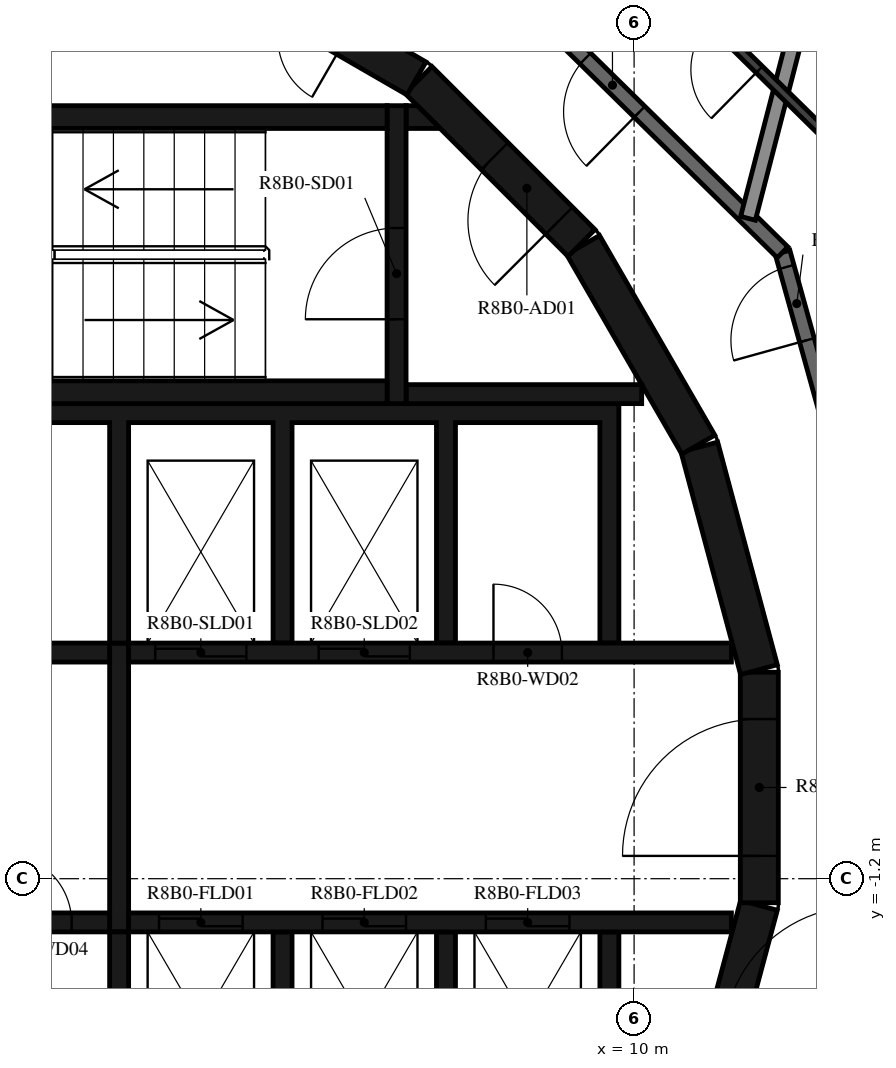
"""IFC4 building model, lengths in metres.
Left out: names, types, materials, properties, quantities, classifications, styles, units other than length and angle.
Written with IfcOpenShell. Run it as: python <this file> out.ifc"""

import sys

from ifc_helpers import new_model, si_unit, direction, frame, frame_2d, origin, place, context, subcontext, project, spatial, polyline, rectangle, outline, extrude, element, fill, save


model = new_model("IFC4")
c1 = context("Model", 3, precision=1e-05, world=origin(), true_north=direction((0.0, 1.0)))
c2 = subcontext(c1, "Body", "Model", "MODEL_VIEW")
j1 = project(units=[si_unit("LENGTHUNIT", "METRE"), si_unit("PLANEANGLEUNIT", "RADIAN")], contexts=[c1])
p1 = place(None, origin())
s1 = spatial("IfcSite", under=j1, at=p1, CompositionType="ELEMENT")
p2 = place(p1, origin())
s2 = spatial("IfcBuilding", under=s1, at=p2, CompositionType="ELEMENT")
p3 = place(p2, frame((0.0, 0.0, 312.2)))
s3 = spatial("IfcBuildingStorey", under=s2, at=p3, CompositionType="ELEMENT", Elevation=312.2)
p4 = place(p3, frame((10.858, -4.479, 0.0), z_axis=(0.0, 0.0, 1.0), x_axis=(0.258734743916, 0.965948410781, 0.0)))
e1 = element("IfcWall", 1, at=p4, inside=s3, PredefinedType="SHEAR", context=c2, shape_type="SweptSolid", body=[
    extrude(rectangle(XDim=3.033, YDim=0.5, at=frame_2d((1.516, 0.0))), origin(), (0.0, 0.0, 1.0), 3.12),
])
p5 = place(p3, frame((11.647, -1.516, 0.0), z_axis=(0.0, 0.0, 1.0), x_axis=(0.0, 1.0, 0.0)))
e2 = element("IfcWall", 2, at=p5, inside=s3, PredefinedType="SHEAR", context=c2, shape_type="SweptSolid", body=[
    extrude(rectangle(XDim=3.033, YDim=0.5, at=frame_2d((1.516, 0.0))), origin(), (0.0, 0.0, 1.0), 3.12),
])
p6 = place(p5, frame((0.616, 0.0, 0.0)))
e3 = element("IfcOpeningElement", 3, at=p6, cuts=e2, PredefinedType="OPENING", context=c2, shape_type="SweptSolid", body=[
    extrude(rectangle(XDim=1.8, YDim=2.1, at=frame_2d((0.9, 1.05))), frame((0.0, 0.26, 0.0), z_axis=(0.0, -1.0, 0.0), x_axis=(1.0, 0.0, 0.0)), (0.0, 0.0, 1.0), 0.52),
])
for number, where, z_axis, x_axis in (
    (4, (11.643, 1.55, 0.0), (0.0, 0.0, 1.0), (-0.259, 0.966, 0.0)),
    (5, (10.845, 4.51, 0.0), (0.0, 0.0, 1.0), (-0.5, 0.866, 0.0)),
):
    element("IfcWall", number, at=place(p3, frame(where, z_axis=z_axis, x_axis=x_axis)), inside=s3, PredefinedType="SHEAR", context=c2, shape_type="SweptSolid", body=[
        extrude(rectangle(XDim=3.033, YDim=0.5, at=frame_2d((1.516, 0.0))), origin(), (0.0, 0.0, 1.0), 3.12),
    ])
p7 = place(p3, frame((9.308, 7.164, 0.0), z_axis=(0.0, 0.0, 1.0), x_axis=(-0.707106781187, 0.707106781187, 0.0)))
e6 = element("IfcWall", 6, at=p7, inside=s3, PredefinedType="SHEAR", context=c2, shape_type="SweptSolid", body=[
    extrude(rectangle(XDim=3.032, YDim=0.5, at=frame_2d((1.516, 0.0))), origin(), (0.0, 0.0, 1.0), 3.12),
])
p8 = place(p7, frame((0.416, 0.0, 0.0)))
e7 = element("IfcOpeningElement", 7, at=p8, cuts=e6, PredefinedType="OPENING", context=c2, shape_type="SweptSolid", body=[
    extrude(rectangle(XDim=1.2, YDim=2.1, at=frame_2d((0.6, 1.05))), frame((0.0, 0.26, 0.0), z_axis=(0.0, -1.0, 0.0), x_axis=(1.0, 0.0, 0.0)), (0.0, 0.0, 1.0), 0.52),
])
p9 = place(p3, frame((7.137, 9.329, 0.0), z_axis=(0.0, 0.0, 1.0), x_axis=(-0.865975092491, 0.500087131594, 0.0)))
e8 = element("IfcWall", 8, at=p9, inside=s3, PredefinedType="SHEAR", context=c2, shape_type="SweptSolid", body=[
    extrude(rectangle(XDim=3.033, YDim=0.5, at=frame_2d((1.516, 0.0))), origin(), (0.0, 0.0, 1.0), 3.12),
])
p10 = place(p9, frame((1.066, 0.0, 0.0)))
e9 = element("IfcOpeningElement", 9, at=p10, cuts=e8, PredefinedType="OPENING", context=c2, shape_type="SweptSolid", body=[
    extrude(rectangle(XDim=0.9, YDim=2.1, at=frame_2d((0.45, 1.05))), frame((0.0, 0.26, 0.0), z_axis=(0.0, -1.0, 0.0), x_axis=(1.0, 0.0, 0.0)), (0.0, 0.0, 1.0), 0.52),
])
for number, where, z_axis, x_axis in (
    (10, (0.0, 5.2, 0.0), (0.0, 0.0, 1.0), (1.0, 0.0, 0.0)),
    (11, (0.0, 8.82, 0.0), (0.0, 0.0, 1.0), (1.0, 0.0, 0.0)),
):
    element("IfcWall", number, at=place(p3, frame(where, z_axis=z_axis, x_axis=x_axis)), inside=s3, PredefinedType="SHEAR", context=c2, shape_type="SweptSolid", body=[
        extrude(rectangle(XDim=6.75, YDim=0.3, at=frame_2d((3.375, 0.0))), origin(), (0.0, 0.0, 1.0), 3.12),
    ])
p11 = place(p3, frame((6.875, 5.05, 0.0), z_axis=(0.0, 0.0, 1.0), x_axis=(0.0, 1.0, 0.0)))
e12 = element("IfcWall", 12, at=p11, inside=s3, PredefinedType="SHEAR", context=c2, shape_type="SweptSolid", body=[
    extrude(rectangle(XDim=3.92, YDim=0.25, at=frame_2d((1.96, 0.0))), origin(), (0.0, 0.0, 1.0), 3.12),
])
p12 = place(p11, frame((1.11, 0.0, 0.0)))
e13 = element("IfcOpeningElement", 13, at=p12, cuts=e12, PredefinedType="OPENING", context=c2, shape_type="SweptSolid", body=[
    extrude(rectangle(XDim=1.2, YDim=2.1, at=frame_2d((0.6, 1.05))), frame((0.0, 0.135, 0.0), z_axis=(0.0, -1.0, 0.0), x_axis=(1.0, 0.0, 0.0)), (0.0, 0.0, 1.0), 0.27),
])
p13 = place(p3, frame((7.0, 5.175, 0.0), z_axis=(0.0, 0.0, 1.0), x_axis=(1.0, 0.0, 0.0)))
e14 = element("IfcWall", 14, at=p13, inside=s3, PredefinedType="SHEAR", context=c2, shape_type="SweptSolid", body=[
    extrude(rectangle(XDim=3.1, YDim=0.25, at=frame_2d((1.55, 0.0))), origin(), (0.0, 0.0, 1.0), 3.12),
])
p14 = place(p3, origin())
e15 = element("IfcWall", 15, at=p14, inside=s3, PredefinedType="SHEAR", context=c2, shape_type="SweptSolid", body=[
    extrude(outline(polyline([(7.448, 8.67), (7.0, 8.67), (7.0, 8.97), (7.148, 8.97), (7.448, 8.67)])), origin(), (0.0, 0.0, 1.0), 3.12),
])
p15 = place(p3, origin())
e16 = element("IfcWall", 16, at=p15, inside=s3, PredefinedType="SHEAR", context=c2, shape_type="SweptSolid", body=[
    extrude(outline(polyline([(-9.8, 1.9), (-9.55, 1.9), (-9.55, 4.8), (3.1, 4.8), (3.1, 1.9), (3.35, 1.9), (3.35, 4.8), (5.25, 4.8), (5.25, 1.9), (5.5, 1.9), (5.5, 4.8), (7.4, 4.8), (7.4, 1.9), (7.65, 1.9), (7.65, 4.8), (9.55, 4.8), (9.55, 1.9), (9.8, 1.9), (9.8, 4.8), (9.8, 5.05), (-9.8, 5.05), (-9.8, 4.8), (-9.8, 1.9)])), origin(), (0.0, 0.0, 1.0), 3.12),
])
p16 = place(p3, origin())
e17 = element("IfcWall", 17, at=p16, inside=s3, PredefinedType="SHEAR", context=c2, shape_type="SweptSolid", body=[
    extrude(outline(polyline([(9.8, -5.05), (9.8, -4.8), (9.8, -1.9), (9.55, -1.9), (9.55, -4.8), (7.65, -4.8), (7.65, -1.9), (7.4, -1.9), (7.4, -4.8), (5.5, -4.8), (5.5, -1.9), (5.25, -1.9), (5.25, -4.8), (3.35, -4.8), (3.35, -1.9), (3.1, -1.9), (3.1, -4.8), (1.2, -4.8), (1.2, -1.9), (0.95, -1.9), (0.95, -4.8), (-0.95, -4.8), (-0.95, -1.9), (-1.2, -1.9), (-1.2, -4.8), (-3.1, -4.8), (-3.1, -1.9), (-3.35, -1.9), (-3.35, -4.8), (-5.25, -4.8), (-5.25, -1.9), (-5.5, -1.9), (-5.5, -4.8), (-9.55, -4.8), (-9.55, -1.9), (-9.8, -1.9), (-9.8, -4.8), (-9.8, -5.05), (9.8, -5.05)])), origin(), (0.0, 0.0, 1.0), 3.12),
])
p17 = place(p3, frame((-11.28, 1.775, 0.0), z_axis=(0.0, 0.0, 1.0), x_axis=(1.0, 0.0, 0.0)))
e18 = element("IfcWall", 18, at=p17, inside=s3, PredefinedType="SHEAR", context=c2, shape_type="SweptSolid", body=[
    extrude(rectangle(XDim=14.38, YDim=0.25, at=frame_2d((7.19, 0.0))), origin(), (0.0, 0.0, 1.0), 3.12),
])
p18 = place(p17, frame((7.605, 0.0, 0.0)))
e19 = element("IfcOpeningElement", 19, at=p18, cuts=e18, PredefinedType="OPENING", context=c2, shape_type="SweptSolid", body=[
    extrude(rectangle(XDim=0.9, YDim=2.1, at=frame_2d((0.45, 1.05))), frame((0.0, 0.135, 0.0), z_axis=(0.0, -1.0, 0.0), x_axis=(1.0, 0.0, 0.0)), (0.0, 0.0, 1.0), 0.27),
])
p19 = place(p3, frame((3.35, 1.775, 0.0), z_axis=(0.0, 0.0, 1.0), x_axis=(1.0, 0.0, 0.0)))
e20 = element("IfcWall", 20, at=p19, inside=s3, PredefinedType="SHEAR", context=c2, shape_type="SweptSolid", body=[
    extrude(rectangle(XDim=7.93, YDim=0.25, at=frame_2d((3.965, 0.0))), origin(), (0.0, 0.0, 1.0), 3.12),
])
p20 = place(p19, frame((0.35, 0.0, 0.0)))
e21 = element("IfcOpeningElement", 21, at=p20, cuts=e20, PredefinedType="OPENING", context=c2, shape_type="SweptSolid", body=[
    extrude(rectangle(XDim=1.2, YDim=2.4, at=frame_2d((0.6, 1.2))), frame((0.0, 0.135, 0.0), z_axis=(0.0, -1.0, 0.0), x_axis=(1.0, 0.0, 0.0)), (0.0, 0.0, 1.0), 0.27),
])
p21 = place(p19, frame((2.5, 0.0, 0.0)))
e22 = element("IfcOpeningElement", 22, at=p21, cuts=e20, PredefinedType="OPENING", context=c2, shape_type="SweptSolid", body=[
    extrude(rectangle(XDim=1.2, YDim=2.4, at=frame_2d((0.6, 1.2))), frame((0.0, 0.135, 0.0), z_axis=(0.0, -1.0, 0.0), x_axis=(1.0, 0.0, 0.0)), (0.0, 0.0, 1.0), 0.27),
])
p22 = place(p19, frame((4.8, 0.0, 0.0)))
e23 = element("IfcOpeningElement", 23, at=p22, cuts=e20, PredefinedType="OPENING", context=c2, shape_type="SweptSolid", body=[
    extrude(rectangle(XDim=0.9, YDim=2.1, at=frame_2d((0.45, 1.05))), frame((0.0, 0.135, 0.0), z_axis=(0.0, -1.0, 0.0), x_axis=(1.0, 0.0, 0.0)), (0.0, 0.0, 1.0), 0.27),
])
p23 = place(p3, frame((-11.28, -1.775, 0.0), z_axis=(0.0, 0.0, 1.0), x_axis=(1.0, 0.0, 0.0)))
e24 = element("IfcWall", 24, at=p23, inside=s3, PredefinedType="SHEAR", context=c2, shape_type="SweptSolid", body=[
    extrude(rectangle(XDim=14.38, YDim=0.25, at=frame_2d((7.19, 0.0))), origin(), (0.0, 0.0, 1.0), 3.12),
])
p24 = place(p23, frame((6.43, 0.0, 0.0)))
e25 = element("IfcOpeningElement", 25, at=p24, cuts=e24, PredefinedType="OPENING", context=c2, shape_type="SweptSolid", body=[
    extrude(rectangle(XDim=1.1, YDim=2.1, at=frame_2d((0.55, 1.05))), frame((0.0, 0.135, 0.0), z_axis=(0.0, -1.0, 0.0), x_axis=(1.0, 0.0, 0.0)), (0.0, 0.0, 1.0), 0.27),
])
p25 = place(p23, frame((8.58, 0.0, 0.0)))
e26 = element("IfcOpeningElement", 26, at=p25, cuts=e24, PredefinedType="OPENING", context=c2, shape_type="SweptSolid", body=[
    extrude(rectangle(XDim=1.1, YDim=2.1, at=frame_2d((0.55, 1.05))), frame((0.0, 0.135, 0.0), z_axis=(0.0, -1.0, 0.0), x_axis=(1.0, 0.0, 0.0)), (0.0, 0.0, 1.0), 0.27),
])
p26 = place(p23, frame((10.73, 0.0, 0.0)))
e27 = element("IfcOpeningElement", 27, at=p26, cuts=e24, PredefinedType="OPENING", context=c2, shape_type="SweptSolid", body=[
    extrude(rectangle(XDim=1.1, YDim=2.1, at=frame_2d((0.55, 1.05))), frame((0.0, 0.135, 0.0), z_axis=(0.0, -1.0, 0.0), x_axis=(1.0, 0.0, 0.0)), (0.0, 0.0, 1.0), 0.27),
])
p27 = place(p23, frame((3.305, 0.0, 0.0)))
e28 = element("IfcOpeningElement", 28, at=p27, cuts=e24, PredefinedType="OPENING", context=c2, shape_type="SweptSolid", body=[
    extrude(rectangle(XDim=0.9, YDim=2.1, at=frame_2d((0.45, 1.05))), frame((0.0, 0.135, 0.0), z_axis=(0.0, -1.0, 0.0), x_axis=(1.0, 0.0, 0.0)), (0.0, 0.0, 1.0), 0.27),
])
p28 = place(p23, frame((12.98, 0.0, 0.0)))
e29 = element("IfcOpeningElement", 29, at=p28, cuts=e24, PredefinedType="OPENING", context=c2, shape_type="SweptSolid", body=[
    extrude(rectangle(XDim=0.9, YDim=2.1, at=frame_2d((0.45, 1.05))), frame((0.0, 0.135, 0.0), z_axis=(0.0, -1.0, 0.0), x_axis=(1.0, 0.0, 0.0)), (0.0, 0.0, 1.0), 0.27),
])
p29 = place(p3, frame((3.35, -1.775, 0.0), z_axis=(0.0, 0.0, 1.0), x_axis=(1.0, 0.0, 0.0)))
e30 = element("IfcWall", 30, at=p29, inside=s3, PredefinedType="SHEAR", context=c2, shape_type="SweptSolid", body=[
    extrude(rectangle(XDim=7.93, YDim=0.25, at=frame_2d((3.965, 0.0))), origin(), (0.0, 0.0, 1.0), 3.12),
])
p30 = place(p29, frame((0.4, 0.0, 0.0)))
e31 = element("IfcOpeningElement", 31, at=p30, cuts=e30, PredefinedType="OPENING", context=c2, shape_type="SweptSolid", body=[
    extrude(rectangle(XDim=1.1, YDim=2.4, at=frame_2d((0.55, 1.2))), frame((0.0, 0.135, 0.0), z_axis=(0.0, -1.0, 0.0), x_axis=(1.0, 0.0, 0.0)), (0.0, 0.0, 1.0), 0.27),
])
p31 = place(p29, frame((2.55, 0.0, 0.0)))
e32 = element("IfcOpeningElement", 32, at=p31, cuts=e30, PredefinedType="OPENING", context=c2, shape_type="SweptSolid", body=[
    extrude(rectangle(XDim=1.1, YDim=2.4, at=frame_2d((0.55, 1.2))), frame((0.0, 0.135, 0.0), z_axis=(0.0, -1.0, 0.0), x_axis=(1.0, 0.0, 0.0)), (0.0, 0.0, 1.0), 0.27),
])
p32 = place(p29, frame((4.7, 0.0, 0.0)))
e33 = element("IfcOpeningElement", 33, at=p32, cuts=e30, PredefinedType="OPENING", context=c2, shape_type="SweptSolid", body=[
    extrude(rectangle(XDim=1.1, YDim=2.4, at=frame_2d((0.55, 1.2))), frame((0.0, 0.135, 0.0), z_axis=(0.0, -1.0, 0.0), x_axis=(1.0, 0.0, 0.0)), (0.0, 0.0, 1.0), 0.27),
])
p33 = place(p3, frame((3.225, -1.9, 0.0), z_axis=(0.0, 0.0, 1.0), x_axis=(0.0, 1.0, 0.0)))
e34 = element("IfcWall", 34, at=p33, inside=s3, PredefinedType="SHEAR", context=c2, shape_type="SweptSolid", body=[
    extrude(rectangle(XDim=3.8, YDim=0.25, at=frame_2d((1.9, 0.0))), origin(), (0.0, 0.0, 1.0), 3.12),
])
p34 = place(p3, frame((12.074, -6.831, 0.0), z_axis=(0.0, 0.0, 1.0), x_axis=(0.250391063186, 0.968144780225, 0.0)))
e35 = element("IfcWall", 35, at=p34, inside=s3, PredefinedType="STANDARD", context=c2, shape_type="SweptSolid", body=[
    extrude(rectangle(XDim=7.181, YDim=0.2, at=frame_2d((3.591, 0.0))), origin(), (0.0, 0.0, 1.0), 3.12),
])
p35 = place(p34, frame((3.581, 0.0, 0.0)))
e36 = element("IfcOpeningElement", 36, at=p35, cuts=e35, PredefinedType="OPENING", context=c2, shape_type="SweptSolid", body=[
    extrude(rectangle(XDim=1.8, YDim=2.1, at=frame_2d((0.9, 1.05))), frame((0.0, 0.11, 0.0), z_axis=(0.0, -1.0, 0.0), x_axis=(1.0, 0.0, 0.0)), (0.0, 0.0, 1.0), 0.22),
])
p36 = place(p3, frame((12.913, 3.581, 0.0), z_axis=(0.0, 0.0, 1.0), x_axis=(-0.267223005422, 0.963634715737, 0.0)))
e37 = element("IfcWall", 37, at=p36, inside=s3, PredefinedType="STANDARD", context=c2, shape_type="SweptSolid", body=[
    extrude(rectangle(XDim=3.591, YDim=0.2, at=frame_2d((1.795, 0.0))), origin(), (0.0, 0.0, 1.0), 3.12),
])
p37 = place(p36, frame((2.39, 0.0, 0.0)))
e38 = element("IfcOpeningElement", 38, at=p37, cuts=e37, PredefinedType="OPENING", context=c2, shape_type="SweptSolid", body=[
    extrude(rectangle(XDim=1.0, YDim=2.1, at=frame_2d((0.5, 1.05))), frame((0.0, 0.11, 0.0), z_axis=(0.0, -1.0, 0.0), x_axis=(1.0, 0.0, 0.0)), (0.0, 0.0, 1.0), 0.22),
])
p38 = place(p3, frame((11.953, 7.041, 0.0), z_axis=(0.0, 0.0, 1.0), x_axis=(-0.713250549143, 0.70090916255, 0.0)))
e39 = element("IfcWall", 39, at=p38, inside=s3, PredefinedType="STANDARD", context=c2, shape_type="SweptSolid", body=[
    extrude(rectangle(XDim=7.181, YDim=0.2, at=frame_2d((3.59, 0.0))), origin(), (0.0, 0.0, 1.0), 3.12),
])
p39 = place(p38, frame((2.637, 0.0, 0.0)))
e40 = element("IfcOpeningElement", 40, at=p39, cuts=e39, PredefinedType="OPENING", context=c2, shape_type="SweptSolid", body=[
    extrude(rectangle(XDim=1.0, YDim=2.1, at=frame_2d((0.5, 1.05))), frame((0.0, 0.11, 0.0), z_axis=(0.0, -1.0, 0.0), x_axis=(1.0, 0.0, 0.0)), (0.0, 0.0, 1.0), 0.22),
])
p40 = place(p3, frame((13.26, 14.3, 0.0), z_axis=(0.0, 0.0, 1.0), x_axis=(-0.250397400042, -0.968143141303, 0.0)))
e41 = element("IfcWall", 41, at=p40, inside=s3, PredefinedType="STANDARD", context=c2, shape_type="SweptSolid", body=[
    extrude(rectangle(XDim=7.037, YDim=0.2, at=frame_2d((3.518, 0.0))), origin(), (0.0, 0.0, 1.0), 2.73),
])
p41 = place(p3, frame((12.873, 8.24, 0.0), z_axis=(0.0, 0.0, 1.0), x_axis=(-0.713251042219, 0.700908660792, 0.0)))
e42 = element("IfcWall", 42, at=p41, inside=s3, PredefinedType="PARTITIONING", context=c2, shape_type="SweptSolid", body=[
    extrude(rectangle(XDim=7.398, YDim=0.12, at=frame_2d((3.699, 0.0))), origin(), (0.0, 0.0, 1.0), 3.12),
])
p42 = place(p41, frame((1.718, 0.0, 0.0)))
e43 = element("IfcOpeningElement", 43, at=p42, cuts=e42, PredefinedType="OPENING", context=c2, shape_type="SweptSolid", body=[
    extrude(rectangle(XDim=0.9, YDim=2.1, at=frame_2d((0.45, 1.05))), frame((0.0, 0.07, 0.0), z_axis=(0.0, -1.0, 0.0), x_axis=(1.0, 0.0, 0.0)), (0.0, 0.0, 1.0), 0.14),
])
p43 = place(p12, origin())
e44 = element("IfcDoor", 44, at=p43, inside=s3, OperationType="SINGLE_SWING_LEFT", PredefinedType="DOOR", context=c2, shape_type="SweptSolid", body=[
    extrude(rectangle(XDim=1.2, YDim=2.1, at=frame_2d((0.6, 1.05))), frame((0.0, 0.025, 0.0), z_axis=(0.0, -1.0, 0.0), x_axis=(1.0, 0.0, 0.0)), (0.0, 0.0, 1.0), 0.05),
])
fill(e13, e44)
p44 = place(p8, origin())
e45 = element("IfcDoor", 45, at=p44, inside=s3, OperationType="SINGLE_SWING_RIGHT", PredefinedType="DOOR", context=c2, shape_type="SweptSolid", body=[
    extrude(rectangle(XDim=1.2, YDim=2.1, at=frame_2d((0.6, 1.05))), frame((0.0, 0.025, 0.0), z_axis=(0.0, -1.0, 0.0), x_axis=(1.0, 0.0, 0.0)), (0.0, 0.0, 1.0), 0.05),
])
fill(e7, e45)
p45 = place(p6, origin())
e46 = element("IfcDoor", 46, at=p45, inside=s3, OperationType="DOUBLE_DOOR_SINGLE_SWING", PredefinedType="DOOR", context=c2, shape_type="SweptSolid", body=[
    extrude(rectangle(XDim=1.8, YDim=2.1, at=frame_2d((0.9, 1.05))), frame((0.0, 0.025, 0.0), z_axis=(0.0, -1.0, 0.0), x_axis=(1.0, 0.0, 0.0)), (0.0, 0.0, 1.0), 0.05),
])
fill(e3, e46)
p46 = place(p20, origin())
e47 = element("IfcDoor", 47, at=p46, inside=s3, OperationType="DOUBLE_DOOR_SLIDING", PredefinedType="DOOR", context=c2, shape_type="SweptSolid", body=[
    extrude(rectangle(XDim=1.2, YDim=2.4, at=frame_2d((0.6, 1.2))), frame((0.0, 0.025, 0.0), z_axis=(0.0, -1.0, 0.0), x_axis=(1.0, 0.0, 0.0)), (0.0, 0.0, 1.0), 0.05),
])
fill(e21, e47)
p47 = place(p21, origin())
e48 = element("IfcDoor", 48, at=p47, inside=s3, OperationType="DOUBLE_DOOR_SLIDING", PredefinedType="DOOR", context=c2, shape_type="SweptSolid", body=[
    extrude(rectangle(XDim=1.2, YDim=2.4, at=frame_2d((0.6, 1.2))), frame((0.0, 0.025, 0.0), z_axis=(0.0, -1.0, 0.0), x_axis=(1.0, 0.0, 0.0)), (0.0, 0.0, 1.0), 0.05),
])
fill(e22, e48)
p48 = place(p30, origin())
e49 = element("IfcDoor", 49, at=p48, inside=s3, OperationType="DOUBLE_DOOR_SLIDING", PredefinedType="DOOR", context=c2, shape_type="SweptSolid", body=[
    extrude(rectangle(XDim=1.1, YDim=2.4, at=frame_2d((0.55, 1.2))), frame((0.0, 0.025, 0.0), z_axis=(0.0, -1.0, 0.0), x_axis=(1.0, 0.0, 0.0)), (0.0, 0.0, 1.0), 0.05),
])
fill(e31, e49)
p49 = place(p31, origin())
e50 = element("IfcDoor", 50, at=p49, inside=s3, OperationType="DOUBLE_DOOR_SLIDING", PredefinedType="DOOR", context=c2, shape_type="SweptSolid", body=[
    extrude(rectangle(XDim=1.1, YDim=2.4, at=frame_2d((0.55, 1.2))), frame((0.0, 0.025, 0.0), z_axis=(0.0, -1.0, 0.0), x_axis=(1.0, 0.0, 0.0)), (0.0, 0.0, 1.0), 0.05),
])
fill(e32, e50)
p50 = place(p32, origin())
e51 = element("IfcDoor", 51, at=p50, inside=s3, OperationType="DOUBLE_DOOR_SLIDING", PredefinedType="DOOR", context=c2, shape_type="SweptSolid", body=[
    extrude(rectangle(XDim=1.1, YDim=2.4, at=frame_2d((0.55, 1.2))), frame((0.0, 0.025, 0.0), z_axis=(0.0, -1.0, 0.0), x_axis=(1.0, 0.0, 0.0)), (0.0, 0.0, 1.0), 0.05),
])
fill(e33, e51)
p51 = place(p22, origin())
e52 = element("IfcDoor", 52, at=p51, inside=s3, OperationType="SINGLE_SWING_RIGHT", PredefinedType="DOOR", context=c2, shape_type="SweptSolid", body=[
    extrude(rectangle(XDim=0.9, YDim=2.1, at=frame_2d((0.45, 1.05))), frame((0.0, 0.025, 0.0), z_axis=(0.0, -1.0, 0.0), x_axis=(1.0, 0.0, 0.0)), (0.0, 0.0, 1.0), 0.05),
])
fill(e23, e52)
p52 = place(p28, origin())
e53 = element("IfcDoor", 53, at=p52, inside=s3, OperationType="SINGLE_SWING_RIGHT", PredefinedType="DOOR", context=c2, shape_type="SweptSolid", body=[
    extrude(rectangle(XDim=0.9, YDim=2.1, at=frame_2d((0.45, 1.05))), frame((0.0, 0.025, 0.0), z_axis=(0.0, -1.0, 0.0), x_axis=(1.0, 0.0, 0.0)), (0.0, 0.0, 1.0), 0.05),
])
fill(e29, e53)
p53 = place(p37, origin())
e54 = element("IfcDoor", 54, at=p53, inside=s3, OperationType="SINGLE_SWING_LEFT", PredefinedType="DOOR", context=c2, shape_type="SweptSolid", body=[
    extrude(rectangle(XDim=1.0, YDim=2.1, at=frame_2d((0.5, 1.05))), frame((0.0, 0.025, 0.0), z_axis=(0.0, -1.0, 0.0), x_axis=(1.0, 0.0, 0.0)), (0.0, 0.0, 1.0), 0.05),
])
fill(e38, e54)
p54 = place(p39, origin())
e55 = element("IfcDoor", 55, at=p54, inside=s3, OperationType="SINGLE_SWING_LEFT", PredefinedType="DOOR", context=c2, shape_type="SweptSolid", body=[
    extrude(rectangle(XDim=1.0, YDim=2.1, at=frame_2d((0.5, 1.05))), frame((0.0, 0.025, 0.0), z_axis=(0.0, -1.0, 0.0), x_axis=(1.0, 0.0, 0.0)), (0.0, 0.0, 1.0), 0.05),
])
fill(e40, e55)
p55 = place(p42, origin())
e56 = element("IfcDoor", 56, at=p55, inside=s3, OperationType="SINGLE_SWING_LEFT", PredefinedType="DOOR", context=c2, shape_type="SweptSolid", body=[
    extrude(rectangle(XDim=0.9, YDim=2.1, at=frame_2d((0.45, 1.05))), frame((0.0, 0.025, 0.0), z_axis=(0.0, -1.0, 0.0), x_axis=(1.0, 0.0, 0.0)), (0.0, 0.0, 1.0), 0.05),
])
fill(e43, e56)
save(model, sys.argv[1])
